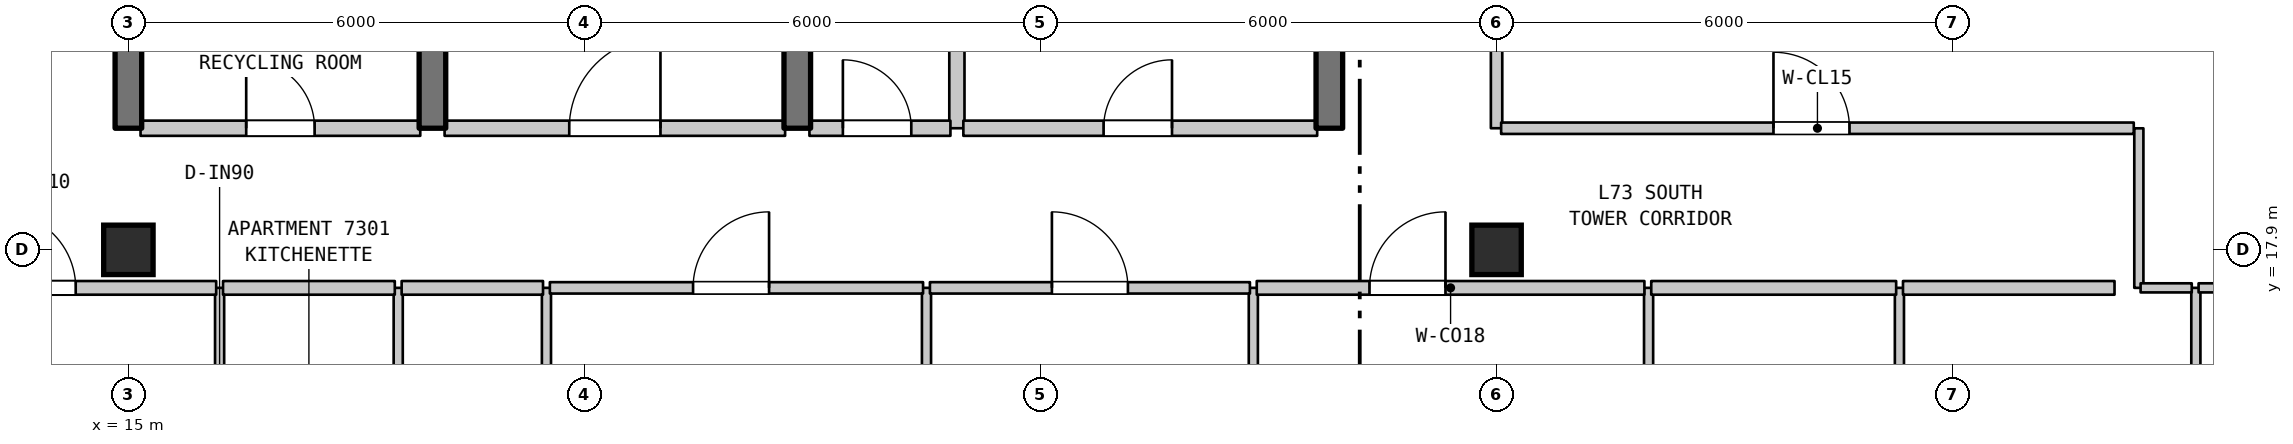
"""IFC4 building model, lengths in metres.
Left out: names, types, materials, properties, quantities, classifications, styles, units other than length and angle.
Written with IfcOpenShell. Run it as: python <this file> out.ifc"""

import sys

from ifc_helpers import new_model, si_unit, direction, frame, frame_2d, origin, origin_2d, place, context, subcontext, project, spatial, rectangle, extrude, element, fill, save


model = new_model("IFC4")
c1 = context("Model", 3, precision=1e-05, world=origin(), true_north=direction((0.0, 1.0)))
c2 = subcontext(c1, "Body", "Model", "MODEL_VIEW")
j1 = project(units=[si_unit("LENGTHUNIT", "METRE"), si_unit("PLANEANGLEUNIT", "RADIAN")], contexts=[c1])
p1 = place(None, origin())
s1 = spatial("IfcSite", under=j1, at=p1, CompositionType="ELEMENT")
p2 = place(p1, origin())
s2 = spatial("IfcBuilding", under=s1, at=p2, CompositionType="ELEMENT")
p3 = place(p2, frame((0.0, 0.0, 291.7)))
s3 = spatial("IfcBuildingStorey", under=s2, at=p3, CompositionType="ELEMENT", Elevation=291.7)
for number, where, z_axis, x_axis in (
    (1, (15.0, 17.9, 0.0), (0.0, 0.0, 1.0), (1.0, 0.0, 0.0)),
    (2, (33.0, 17.9, 0.0), (0.0, 0.0, 1.0), (1.0, 0.0, 0.0)),
):
    element("IfcColumn", number, at=place(p3, frame(where, z_axis=z_axis, x_axis=x_axis)), inside=s3, PredefinedType="COLUMN", context=c2, shape_type="SweptSolid", body=[
        extrude(rectangle(XDim=0.65, YDim=0.65, at=origin_2d()), origin(), (0.0, 0.0, 1.0), 3.7),
    ])
p4 = place(p3, frame((15.0, 19.5, 0.0), z_axis=(0.0, 0.0, 1.0), x_axis=(0.0, 1.0, 0.0)))
e3 = element("IfcWall", 3, at=p4, inside=s3, PredefinedType="SHEAR", context=c2, shape_type="SweptSolid", body=[
    extrude(rectangle(XDim=3.2, YDim=0.35, at=frame_2d((1.6, 0.0))), origin(), (0.0, 0.0, 1.0), 3.39),
])
p5 = place(p3, frame((16.2, 14.2, 0.0), z_axis=(0.0, 0.0, 1.0), x_axis=(0.0, 1.0, 0.0)))
e4 = element("IfcWall", 4, at=p5, inside=s3, PredefinedType="PARTITIONING", context=c2, shape_type="SweptSolid", body=[
    extrude(rectangle(XDim=3.2, YDim=0.12, at=frame_2d((1.6, 0.0))), origin(), (0.0, 0.0, 1.0), 3.39),
])
p6 = place(p5, frame((1.15, 0.0, 0.0)))
e5 = element("IfcOpeningElement", 5, at=p6, cuts=e4, PredefinedType="OPENING", context=c2, shape_type="SweptSolid", body=[
    extrude(rectangle(XDim=0.9, YDim=2.15, at=frame_2d((0.45, 1.075))), frame((0.0, 0.07, 0.0), z_axis=(0.0, -1.0, 0.0), x_axis=(1.0, 0.0, 0.0)), (0.0, 0.0, 1.0), 0.14),
])
p7 = place(p3, frame((18.55, 14.2, 0.0), z_axis=(0.0, 0.0, 1.0), x_axis=(0.0, 1.0, 0.0)))
e6 = element("IfcWall", 6, at=p7, inside=s3, PredefinedType="PARTITIONING", context=c2, shape_type="SweptSolid", body=[
    extrude(rectangle(XDim=3.2, YDim=0.12, at=frame_2d((1.6, 0.0))), origin(), (0.0, 0.0, 1.0), 3.39),
])
p8 = place(p3, frame((19.0, 19.5, 0.0), z_axis=(0.0, 0.0, 1.0), x_axis=(0.0, 1.0, 0.0)))
e7 = element("IfcWall", 7, at=p8, inside=s3, PredefinedType="SHEAR", context=c2, shape_type="SweptSolid", body=[
    extrude(rectangle(XDim=3.2, YDim=0.35, at=frame_2d((1.6, 0.0))), origin(), (0.0, 0.0, 1.0), 3.39),
])
p9 = place(p3, frame((20.5, 7.189, 0.0), z_axis=(0.0, 0.0, 1.0), x_axis=(0.0, 1.0, 0.0)))
e8 = element("IfcWall", 8, at=p9, inside=s3, PredefinedType="PARTITIONING", context=c2, shape_type="SweptSolid", body=[
    extrude(rectangle(XDim=10.211, YDim=0.12, at=frame_2d((5.105, 0.0))), origin(), (0.0, 0.0, 1.0), 3.39),
])
p10 = place(p3, frame((23.8, 19.5, 0.0), z_axis=(0.0, 0.0, 1.0), x_axis=(0.0, 1.0, 0.0)))
e9 = element("IfcWall", 9, at=p10, inside=s3, PredefinedType="SHEAR", context=c2, shape_type="SweptSolid", body=[
    extrude(rectangle(XDim=6.6, YDim=0.35, at=frame_2d((3.3, 0.0))), origin(), (0.0, 0.0, 1.0), 3.39),
])
p11 = place(p10, frame((4.304, 0.0, 0.0)))
e10 = element("IfcOpeningElement", 10, at=p11, cuts=e9, PredefinedType="OPENING", context=c2, shape_type="SweptSolid", body=[
    extrude(rectangle(XDim=0.9, YDim=2.15, at=frame_2d((0.45, 1.075))), frame((0.0, 0.185, 0.0), z_axis=(0.0, -1.0, 0.0), x_axis=(1.0, 0.0, 0.0)), (0.0, 0.0, 1.0), 0.37),
])
p12 = place(p3, frame((25.5, 6.71, 0.0), z_axis=(0.0, 0.0, 1.0), x_axis=(0.0, 1.0, 0.0)))
e11 = element("IfcWall", 11, at=p12, inside=s3, PredefinedType="PARTITIONING", context=c2, shape_type="SweptSolid", body=[
    extrude(rectangle(XDim=10.69, YDim=0.12, at=frame_2d((5.345, 0.0))), origin(), (0.0, 0.0, 1.0), 3.39),
])
p13 = place(p3, frame((25.9, 19.5, 0.0), z_axis=(0.0, 0.0, 1.0), x_axis=(0.0, 1.0, 0.0)))
e12 = element("IfcWall", 12, at=p13, inside=s3, PredefinedType="STANDARD", context=c2, shape_type="SweptSolid", body=[
    extrude(rectangle(XDim=3.2, YDim=0.2, at=frame_2d((1.6, 0.0))), origin(), (0.0, 0.0, 1.0), 3.39),
])
p14 = place(p3, frame((29.8, 6.71, 0.0), z_axis=(0.0, 0.0, 1.0), x_axis=(0.0, 1.0, 0.0)))
e13 = element("IfcWall", 13, at=p14, inside=s3, PredefinedType="PARTITIONING", context=c2, shape_type="SweptSolid", body=[
    extrude(rectangle(XDim=10.69, YDim=0.12, at=frame_2d((5.345, 0.0))), origin(), (0.0, 0.0, 1.0), 3.39),
])
p15 = place(p3, frame((30.8, 19.5, 0.0), z_axis=(0.0, 0.0, 1.0), x_axis=(0.0, 1.0, 0.0)))
e14 = element("IfcWall", 14, at=p15, inside=s3, PredefinedType="SHEAR", context=c2, shape_type="SweptSolid", body=[
    extrude(rectangle(XDim=3.2, YDim=0.35, at=frame_2d((1.6, 0.0))), origin(), (0.0, 0.0, 1.0), 3.39),
])
p16 = place(p3, frame((33.0, 19.5, 0.0), z_axis=(0.0, 0.0, 1.0), x_axis=(0.0, 1.0, 0.0)))
e15 = element("IfcWall", 15, at=p16, inside=s3, PredefinedType="STANDARD", context=c2, shape_type="SweptSolid", body=[
    extrude(rectangle(XDim=5.1, YDim=0.15, at=frame_2d((2.55, 0.0))), origin(), (0.0, 0.0, 1.0), 3.1),
])
p17 = place(p16, frame((1.547, 0.0, 0.0)))
e16 = element("IfcOpeningElement", 16, at=p17, cuts=e15, PredefinedType="OPENING", context=c2, shape_type="SweptSolid", body=[
    extrude(rectangle(XDim=1.0, YDim=2.15, at=frame_2d((0.5, 1.075))), frame((0.0, 0.085, 0.0), z_axis=(0.0, -1.0, 0.0), x_axis=(1.0, 0.0, 0.0)), (0.0, 0.0, 1.0), 0.17),
])
for number, where, z_axis, x_axis in (
    (17, (35.0, 13.62, 0.0), (0.0, 0.0, 1.0), (0.0, 1.0, 0.0)),
    (18, (38.3, 13.62, 0.0), (0.0, 0.0, 1.0), (0.0, 1.0, 0.0)),
):
    element("IfcWall", number, at=place(p3, frame(where, z_axis=z_axis, x_axis=x_axis)), inside=s3, PredefinedType="PARTITIONING", context=c2, shape_type="SweptSolid", body=[
        extrude(rectangle(XDim=3.78, YDim=0.12, at=frame_2d((1.89, 0.0))), origin(), (0.0, 0.0, 1.0), 3.39),
    ])
p18 = place(p3, frame((41.45, 17.4, 0.0), z_axis=(0.0, 0.0, 1.0), x_axis=(0.0, 1.0, 0.0)))
e19 = element("IfcWall", 19, at=p18, inside=s3, PredefinedType="PARTITIONING", context=c2, shape_type="SweptSolid", body=[
    extrude(rectangle(XDim=2.099, YDim=0.12, at=frame_2d((1.05, 0.0))), origin(), (0.0, 0.0, 1.0), 3.39),
])
p19 = place(p3, frame((42.2, 13.62, 0.0), z_axis=(0.0, 0.0, 1.0), x_axis=(0.0, 1.0, 0.0)))
e20 = element("IfcWall", 20, at=p19, inside=s3, PredefinedType="PARTITIONING", context=c2, shape_type="SweptSolid", body=[
    extrude(rectangle(XDim=3.78, YDim=0.12, at=frame_2d((1.89, 0.0))), origin(), (0.0, 0.0, 1.0), 3.39),
])
p20 = place(p3, frame((12.975, 17.4, 0.0), z_axis=(0.0, 0.0, 1.0), x_axis=(1.0, 0.0, 0.0)))
e21 = element("IfcWall", 21, at=p20, inside=s3, PredefinedType="STANDARD", context=c2, shape_type="SweptSolid", body=[
    extrude(rectangle(XDim=3.18, YDim=0.18, at=frame_2d((1.59, 0.0))), origin(), (0.0, 0.0, 1.0), 3.39),
])
p21 = place(p20, frame((0.332, 0.0, 0.0)))
e22 = element("IfcOpeningElement", 22, at=p21, cuts=e21, PredefinedType="OPENING", context=c2, shape_type="SweptSolid", body=[
    extrude(rectangle(XDim=1.0, YDim=2.15, at=frame_2d((0.5, 1.075))), frame((0.0, 0.1, 0.0), z_axis=(0.0, -1.0, 0.0), x_axis=(1.0, 0.0, 0.0)), (0.0, 0.0, 1.0), 0.2),
])
p22 = place(p3, frame((16.245, 17.4, 0.0), z_axis=(0.0, 0.0, 1.0), x_axis=(1.0, 0.0, 0.0)))
e23 = element("IfcWall", 23, at=p22, inside=s3, PredefinedType="STANDARD", context=c2, shape_type="SweptSolid", body=[
    extrude(rectangle(XDim=2.26, YDim=0.18, at=frame_2d((1.13, 0.0))), origin(), (0.0, 0.0, 1.0), 3.39),
])
p23 = place(p3, frame((18.595, 17.4, 0.0), z_axis=(0.0, 0.0, 1.0), x_axis=(1.0, 0.0, 0.0)))
e24 = element("IfcWall", 24, at=p23, inside=s3, PredefinedType="STANDARD", context=c2, shape_type="SweptSolid", body=[
    extrude(rectangle(XDim=1.86, YDim=0.18, at=frame_2d((0.93, 0.0))), origin(), (0.0, 0.0, 1.0), 3.39),
])
p24 = place(p3, frame((20.545, 17.4, 0.0), z_axis=(0.0, 0.0, 1.0), x_axis=(1.0, 0.0, 0.0)))
e25 = element("IfcWall", 25, at=p24, inside=s3, PredefinedType="STANDARD", context=c2, shape_type="SweptSolid", body=[
    extrude(rectangle(XDim=4.91, YDim=0.15, at=frame_2d((2.455, 0.0))), origin(), (0.0, 0.0, 1.0), 3.39),
])
p25 = place(p24, frame((1.884, 0.0, 0.0)))
e26 = element("IfcOpeningElement", 26, at=p25, cuts=e25, PredefinedType="OPENING", context=c2, shape_type="SweptSolid", body=[
    extrude(rectangle(XDim=1.0, YDim=2.15, at=frame_2d((0.5, 1.075))), frame((0.0, 0.085, 0.0), z_axis=(0.0, -1.0, 0.0), x_axis=(1.0, 0.0, 0.0)), (0.0, 0.0, 1.0), 0.17),
])
p26 = place(p3, frame((25.545, 17.4, 0.0), z_axis=(0.0, 0.0, 1.0), x_axis=(1.0, 0.0, 0.0)))
e27 = element("IfcWall", 27, at=p26, inside=s3, PredefinedType="STANDARD", context=c2, shape_type="SweptSolid", body=[
    extrude(rectangle(XDim=4.21, YDim=0.15, at=frame_2d((2.105, 0.0))), origin(), (0.0, 0.0, 1.0), 3.39),
])
p27 = place(p26, frame((1.605, 0.0, 0.0)))
e28 = element("IfcOpeningElement", 28, at=p27, cuts=e27, PredefinedType="OPENING", context=c2, shape_type="SweptSolid", body=[
    extrude(rectangle(XDim=1.0, YDim=2.15, at=frame_2d((0.5, 1.075))), frame((0.0, 0.085, 0.0), z_axis=(0.0, -1.0, 0.0), x_axis=(1.0, 0.0, 0.0)), (0.0, 0.0, 1.0), 0.17),
])
p28 = place(p3, frame((29.845, 17.4, 0.0), z_axis=(0.0, 0.0, 1.0), x_axis=(1.0, 0.0, 0.0)))
e29 = element("IfcWall", 29, at=p28, inside=s3, PredefinedType="STANDARD", context=c2, shape_type="SweptSolid", body=[
    extrude(rectangle(XDim=5.1, YDim=0.18, at=frame_2d((2.55, 0.0))), origin(), (0.0, 0.0, 1.0), 3.39),
])
p29 = place(p28, frame((1.483, 0.0, 0.0)))
e30 = element("IfcOpeningElement", 30, at=p29, cuts=e29, PredefinedType="OPENING", context=c2, shape_type="SweptSolid", body=[
    extrude(rectangle(XDim=1.0, YDim=2.15, at=frame_2d((0.5, 1.075))), frame((0.0, 0.1, 0.0), z_axis=(0.0, -1.0, 0.0), x_axis=(1.0, 0.0, 0.0)), (0.0, 0.0, 1.0), 0.2),
])
p30 = place(p3, frame((35.035, 17.4, 0.0), z_axis=(0.0, 0.0, 1.0), x_axis=(1.0, 0.0, 0.0)))
e31 = element("IfcWall", 31, at=p30, inside=s3, PredefinedType="STANDARD", context=c2, shape_type="SweptSolid", body=[
    extrude(rectangle(XDim=3.222, YDim=0.18, at=frame_2d((1.611, 0.0))), origin(), (0.0, 0.0, 1.0), 3.39),
])
p31 = place(p3, frame((38.347, 17.4, 0.0), z_axis=(0.0, 0.0, 1.0), x_axis=(1.0, 0.0, 0.0)))
e32 = element("IfcWall", 32, at=p31, inside=s3, PredefinedType="STANDARD", context=c2, shape_type="SweptSolid", body=[
    extrude(rectangle(XDim=2.783, YDim=0.18, at=frame_2d((1.392, 0.0))), origin(), (0.0, 0.0, 1.0), 3.39),
])
p32 = place(p3, frame((41.473, 17.4, 0.0), z_axis=(0.0, 0.0, 1.0), x_axis=(1.0, 0.0, 0.0)))
e33 = element("IfcWall", 33, at=p32, inside=s3, PredefinedType="PARTITIONING", context=c2, shape_type="SweptSolid", body=[
    extrude(rectangle(XDim=0.673, YDim=0.12, at=frame_2d((0.336, 0.0))), origin(), (0.0, 0.0, 1.0), 3.39),
])
p33 = place(p3, frame((42.236, 17.4, 0.0), z_axis=(0.0, 0.0, 1.0), x_axis=(1.0, 0.0, 0.0)))
e34 = element("IfcWall", 34, at=p33, inside=s3, PredefinedType="PARTITIONING", context=c2, shape_type="SweptSolid", body=[
    extrude(rectangle(XDim=1.268, YDim=0.12, at=frame_2d((0.634, 0.0))), origin(), (0.0, 0.0, 1.0), 3.39),
])
p34 = place(p3, frame((15.16, 19.5, 0.0), z_axis=(0.0, 0.0, 1.0), x_axis=(1.0, 0.0, 0.0)))
e35 = element("IfcWall", 35, at=p34, inside=s3, PredefinedType="STANDARD", context=c2, shape_type="SweptSolid", body=[
    extrude(rectangle(XDim=3.68, YDim=0.2, at=frame_2d((1.84, 0.0))), origin(), (0.0, 0.0, 1.0), 3.39),
])
p35 = place(p34, frame((1.39, 0.0, 0.0)))
e36 = element("IfcOpeningElement", 36, at=p35, cuts=e35, PredefinedType="OPENING", context=c2, shape_type="SweptSolid", body=[
    extrude(rectangle(XDim=0.9, YDim=2.15, at=frame_2d((0.45, 1.075))), frame((0.0, 0.11, 0.0), z_axis=(0.0, -1.0, 0.0), x_axis=(1.0, 0.0, 0.0)), (0.0, 0.0, 1.0), 0.22),
])
p36 = place(p3, frame((19.16, 19.5, 0.0), z_axis=(0.0, 0.0, 1.0), x_axis=(1.0, 0.0, 0.0)))
e37 = element("IfcWall", 37, at=p36, inside=s3, PredefinedType="STANDARD", context=c2, shape_type="SweptSolid", body=[
    extrude(rectangle(XDim=4.48, YDim=0.2, at=frame_2d((2.24, 0.0))), origin(), (0.0, 0.0, 1.0), 3.39),
])
p37 = place(p36, frame((1.64, 0.0, 0.0)))
e38 = element("IfcOpeningElement", 38, at=p37, cuts=e37, PredefinedType="OPENING", context=c2, shape_type="SweptSolid", body=[
    extrude(rectangle(XDim=1.2, YDim=2.2, at=frame_2d((0.6, 1.1))), frame((0.0, 0.11, 0.0), z_axis=(0.0, -1.0, 0.0), x_axis=(1.0, 0.0, 0.0)), (0.0, 0.0, 1.0), 0.22),
])
p38 = place(p3, frame((23.96, 19.5, 0.0), z_axis=(0.0, 0.0, 1.0), x_axis=(1.0, 0.0, 0.0)))
e39 = element("IfcWall", 39, at=p38, inside=s3, PredefinedType="STANDARD", context=c2, shape_type="SweptSolid", body=[
    extrude(rectangle(XDim=1.855, YDim=0.2, at=frame_2d((0.927, 0.0))), origin(), (0.0, 0.0, 1.0), 3.39),
])
p39 = place(p38, frame((0.44, 0.0, 0.0)))
e40 = element("IfcOpeningElement", 40, at=p39, cuts=e39, PredefinedType="OPENING", context=c2, shape_type="SweptSolid", body=[
    extrude(rectangle(XDim=0.9, YDim=2.15, at=frame_2d((0.45, 1.075))), frame((0.0, 0.11, 0.0), z_axis=(0.0, -1.0, 0.0), x_axis=(1.0, 0.0, 0.0)), (0.0, 0.0, 1.0), 0.22),
])
p40 = place(p3, frame((25.985, 19.5, 0.0), z_axis=(0.0, 0.0, 1.0), x_axis=(1.0, 0.0, 0.0)))
e41 = element("IfcWall", 41, at=p40, inside=s3, PredefinedType="STANDARD", context=c2, shape_type="SweptSolid", body=[
    extrude(rectangle(XDim=4.655, YDim=0.2, at=frame_2d((2.327, 0.0))), origin(), (0.0, 0.0, 1.0), 3.39),
])
p41 = place(p40, frame((1.845, 0.0, 0.0)))
e42 = element("IfcOpeningElement", 42, at=p41, cuts=e41, PredefinedType="OPENING", context=c2, shape_type="SweptSolid", body=[
    extrude(rectangle(XDim=0.9, YDim=2.15, at=frame_2d((0.45, 1.075))), frame((0.0, 0.11, 0.0), z_axis=(0.0, -1.0, 0.0), x_axis=(1.0, 0.0, 0.0)), (0.0, 0.0, 1.0), 0.22),
])
p42 = place(p3, frame((33.06, 19.5, 0.0), z_axis=(0.0, 0.0, 1.0), x_axis=(1.0, 0.0, 0.0)))
e43 = element("IfcWall", 43, at=p42, inside=s3, PredefinedType="STANDARD", context=c2, shape_type="SweptSolid", body=[
    extrude(rectangle(XDim=8.323, YDim=0.15, at=frame_2d((4.162, 0.0))), origin(), (0.0, 0.0, 1.0), 3.39),
])
p43 = place(p42, frame((3.583, 0.0, 0.0)))
e44 = element("IfcOpeningElement", 44, at=p43, cuts=e43, PredefinedType="OPENING", context=c2, shape_type="SweptSolid", body=[
    extrude(rectangle(XDim=1.0, YDim=2.15, at=frame_2d((0.5, 1.075))), frame((0.0, 0.085, 0.0), z_axis=(0.0, -1.0, 0.0), x_axis=(1.0, 0.0, 0.0)), (0.0, 0.0, 1.0), 0.17),
])
p44 = place(p21, origin())
e45 = element("IfcDoor", 45, at=p44, inside=s3, OperationType="SINGLE_SWING_LEFT", PredefinedType="DOOR", context=c2, shape_type="SweptSolid", body=[
    extrude(rectangle(XDim=1.0, YDim=2.15, at=frame_2d((0.5, 1.075))), frame((0.0, 0.025, 0.0), z_axis=(0.0, -1.0, 0.0), x_axis=(1.0, 0.0, 0.0)), (0.0, 0.0, 1.0), 0.05),
])
fill(e22, e45)
p45 = place(p25, origin())
e46 = element("IfcDoor", 46, at=p45, inside=s3, OperationType="SINGLE_SWING_RIGHT", PredefinedType="DOOR", context=c2, shape_type="SweptSolid", body=[
    extrude(rectangle(XDim=1.0, YDim=2.15, at=frame_2d((0.5, 1.075))), frame((0.0, 0.025, 0.0), z_axis=(0.0, -1.0, 0.0), x_axis=(1.0, 0.0, 0.0)), (0.0, 0.0, 1.0), 0.05),
])
fill(e26, e46)
p46 = place(p27, origin())
e47 = element("IfcDoor", 47, at=p46, inside=s3, OperationType="SINGLE_SWING_LEFT", PredefinedType="DOOR", context=c2, shape_type="SweptSolid", body=[
    extrude(rectangle(XDim=1.0, YDim=2.15, at=frame_2d((0.5, 1.075))), frame((0.0, 0.025, 0.0), z_axis=(0.0, -1.0, 0.0), x_axis=(1.0, 0.0, 0.0)), (0.0, 0.0, 1.0), 0.05),
])
fill(e28, e47)
p47 = place(p29, origin())
e48 = element("IfcDoor", 48, at=p47, inside=s3, OperationType="SINGLE_SWING_RIGHT", PredefinedType="DOOR", context=c2, shape_type="SweptSolid", body=[
    extrude(rectangle(XDim=1.0, YDim=2.15, at=frame_2d((0.5, 1.075))), frame((0.0, 0.025, 0.0), z_axis=(0.0, -1.0, 0.0), x_axis=(1.0, 0.0, 0.0)), (0.0, 0.0, 1.0), 0.05),
])
fill(e30, e48)
p48 = place(p35, origin())
e49 = element("IfcDoor", 49, at=p48, inside=s3, OperationType="SINGLE_SWING_LEFT", PredefinedType="DOOR", context=c2, shape_type="SweptSolid", body=[
    extrude(rectangle(XDim=0.9, YDim=2.15, at=frame_2d((0.45, 1.075))), frame((0.0, 0.025, 0.0), z_axis=(0.0, -1.0, 0.0), x_axis=(1.0, 0.0, 0.0)), (0.0, 0.0, 1.0), 0.05),
])
fill(e36, e49)
p49 = place(p37, origin())
e50 = element("IfcDoor", 50, at=p49, inside=s3, OperationType="SINGLE_SWING_RIGHT", PredefinedType="DOOR", context=c2, shape_type="SweptSolid", body=[
    extrude(rectangle(XDim=1.2, YDim=2.2, at=frame_2d((0.6, 1.1))), frame((0.0, 0.025, 0.0), z_axis=(0.0, -1.0, 0.0), x_axis=(1.0, 0.0, 0.0)), (0.0, 0.0, 1.0), 0.05),
])
fill(e38, e50)
p50 = place(p39, origin())
e51 = element("IfcDoor", 51, at=p50, inside=s3, OperationType="SINGLE_SWING_LEFT", PredefinedType="DOOR", context=c2, shape_type="SweptSolid", body=[
    extrude(rectangle(XDim=0.9, YDim=2.15, at=frame_2d((0.45, 1.075))), frame((0.0, 0.025, 0.0), z_axis=(0.0, -1.0, 0.0), x_axis=(1.0, 0.0, 0.0)), (0.0, 0.0, 1.0), 0.05),
])
fill(e40, e51)
p51 = place(p41, origin())
e52 = element("IfcDoor", 52, at=p51, inside=s3, OperationType="SINGLE_SWING_RIGHT", PredefinedType="DOOR", context=c2, shape_type="SweptSolid", body=[
    extrude(rectangle(XDim=0.9, YDim=2.15, at=frame_2d((0.45, 1.075))), frame((0.0, 0.025, 0.0), z_axis=(0.0, -1.0, 0.0), x_axis=(1.0, 0.0, 0.0)), (0.0, 0.0, 1.0), 0.05),
])
fill(e42, e52)
p52 = place(p43, origin())
e53 = element("IfcDoor", 53, at=p52, inside=s3, OperationType="SINGLE_SWING_LEFT", PredefinedType="DOOR", context=c2, shape_type="SweptSolid", body=[
    extrude(rectangle(XDim=1.0, YDim=2.15, at=frame_2d((0.5, 1.075))), frame((0.0, 0.025, 0.0), z_axis=(0.0, -1.0, 0.0), x_axis=(1.0, 0.0, 0.0)), (0.0, 0.0, 1.0), 0.05),
])
fill(e44, e53)
save(model, sys.argv[1])
